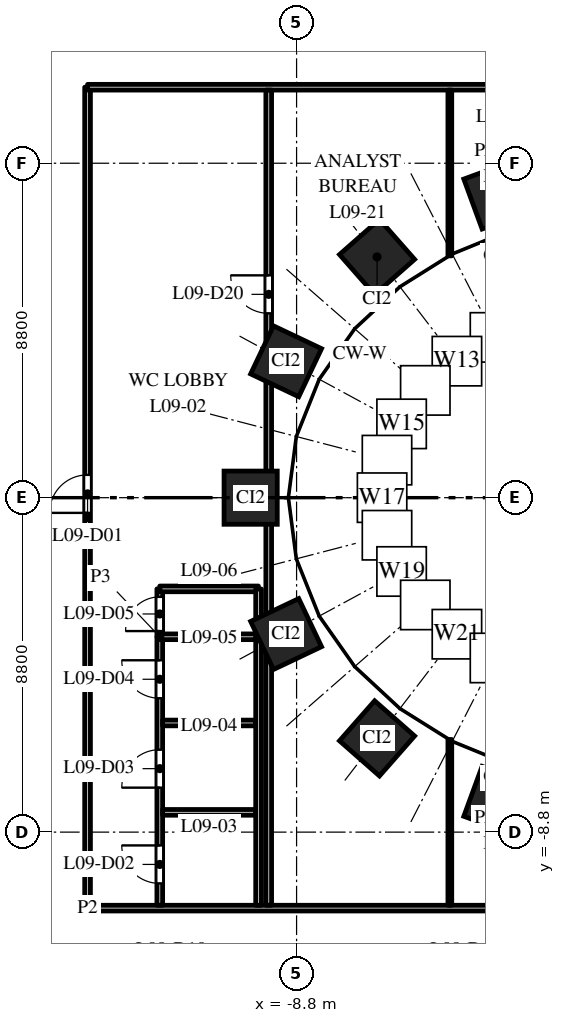
"""IFC4 building model, lengths in metres.
Left out: names, types, materials, properties, quantities, classifications, styles, units other than length and angle.
Written with IfcOpenShell. Run it as: python <this file> out.ifc"""

import sys

from ifc_helpers import new_model, si_unit, direction, frame, frame_2d, origin, origin_2d, place, context, subcontext, project, spatial, rectangle, extrude, element, fill, save


model = new_model("IFC4")
c1 = context("Model", 3, precision=1e-05, world=origin(), true_north=direction((0.0, 1.0)))
c2 = subcontext(c1, "Body", "Model", "MODEL_VIEW")
j1 = project(units=[si_unit("LENGTHUNIT", "METRE"), si_unit("PLANEANGLEUNIT", "RADIAN")], contexts=[c1])
p1 = place(None, origin())
s1 = spatial("IfcSite", under=j1, at=p1, CompositionType="ELEMENT")
p2 = place(p1, origin())
s2 = spatial("IfcBuilding", under=s1, at=p2, CompositionType="ELEMENT")
p3 = place(p2, frame((0.0, 0.0, 46.5)))
s3 = spatial("IfcBuildingStorey", under=s2, at=p3, CompositionType="ELEMENT", Elevation=46.5)
for number, where, z_axis, x_axis in (
    (1, (-3.501, 7.967, 0.0), (0.0, 0.0, 1.0), (-0.939, -0.344, 0.0)),
    (2, (-6.682, 6.334, 0.0), (0.0, 0.0, 1.0), (-0.751, -0.66, 0.0)),
    (3, (-9.076, 3.588, 0.0), (0.0, 0.0, 1.0), (-0.429, -0.903, 0.0)),
    (4, (-10.008, 0.0, 0.0), (0.0, 0.0, 1.0), (0.0, -1.0, 0.0)),
    (5, (-9.076, -3.588, 0.0), (0.0, 0.0, 1.0), (0.429, -0.903, 0.0)),
    (6, (-6.682, -6.334, 0.0), (0.0, 0.0, 1.0), (0.751, -0.66, 0.0)),
    (7, (-3.501, -7.967, 0.0), (0.0, 0.0, 1.0), (0.939, -0.344, 0.0)),
):
    element("IfcColumn", number, at=place(p3, frame(where, z_axis=z_axis, x_axis=x_axis)), inside=s3, PredefinedType="COLUMN", context=c2, shape_type="SweptSolid", body=[
        extrude(rectangle(XDim=1.4, YDim=1.4, at=origin_2d()), origin(), (0.0, 0.0, 1.0), 4.0),
    ])
p4 = place(p3, frame((-14.3, -10.8, 0.0), z_axis=(0.0, 0.0, 1.0), x_axis=(0.0, 1.0, 0.0)))
e8 = element("IfcWall", 8, at=p4, inside=s3, PredefinedType="PARTITIONING", context=c2, shape_type="SweptSolid", body=[
    extrude(rectangle(XDim=21.6, YDim=0.15, at=frame_2d((10.8, 0.0))), origin(), (0.0, 0.0, 1.0), 2.75),
])
p5 = place(p4, frame((10.4, 0.0, 0.0)))
e9 = element("IfcOpeningElement", 9, at=p5, cuts=e8, PredefinedType="OPENING", context=c2, shape_type="SweptSolid", body=[
    extrude(rectangle(XDim=1.0, YDim=2.1, at=frame_2d((0.5, 1.05))), frame((0.0, 0.085, 0.0), z_axis=(0.0, -1.0, 0.0), x_axis=(1.0, 0.0, 0.0)), (0.0, 0.0, 1.0), 0.17),
])
p6 = place(p3, frame((-14.3, -10.8, 0.0), z_axis=(0.0, 0.0, 1.0), x_axis=(1.0, 0.0, 0.0)))
e10 = element("IfcWall", 10, at=p6, inside=s3, PredefinedType="PARTITIONING", context=c2, shape_type="SweptSolid", body=[
    extrude(rectangle(XDim=28.6, YDim=0.15, at=frame_2d((14.3, 0.0))), origin(), (0.0, 0.0, 1.0), 2.85),
])
p7 = place(p6, frame((11.4, 0.0, 0.0)))
e11 = element("IfcOpeningElement", 11, at=p7, cuts=e10, PredefinedType="OPENING", context=c2, shape_type="SweptSolid", body=[
    extrude(rectangle(XDim=1.0, YDim=2.1, at=frame_2d((0.5, 1.05))), frame((0.0, 0.085, 0.0), z_axis=(0.0, -1.0, 0.0), x_axis=(1.0, 0.0, 0.0)), (0.0, 0.0, 1.0), 0.17),
])
p8 = place(p6, frame((16.167, 0.0, 0.0)))
e12 = element("IfcOpeningElement", 12, at=p8, cuts=e10, PredefinedType="OPENING", context=c2, shape_type="SweptSolid", body=[
    extrude(rectangle(XDim=1.0, YDim=2.1, at=frame_2d((0.5, 1.05))), frame((0.0, 0.085, 0.0), z_axis=(0.0, -1.0, 0.0), x_axis=(1.0, 0.0, 0.0)), (0.0, 0.0, 1.0), 0.17),
])
p9 = place(p3, frame((-14.3, 10.8, 0.0), z_axis=(0.0, 0.0, 1.0), x_axis=(1.0, 0.0, 0.0)))
e13 = element("IfcWall", 13, at=p9, inside=s3, PredefinedType="PARTITIONING", context=c2, shape_type="SweptSolid", body=[
    extrude(rectangle(XDim=28.6, YDim=0.15, at=frame_2d((14.3, 0.0))), origin(), (0.0, 0.0, 1.0), 2.85),
])
p10 = place(p9, frame((11.433, 0.0, 0.0)))
e14 = element("IfcOpeningElement", 14, at=p10, cuts=e13, PredefinedType="OPENING", context=c2, shape_type="SweptSolid", body=[
    extrude(rectangle(XDim=1.0, YDim=2.1, at=frame_2d((0.5, 1.05))), frame((0.0, 0.085, 0.0), z_axis=(0.0, -1.0, 0.0), x_axis=(1.0, 0.0, 0.0)), (0.0, 0.0, 1.0), 0.17),
])
p11 = place(p9, frame((16.2, 0.0, 0.0)))
e15 = element("IfcOpeningElement", 15, at=p11, cuts=e13, PredefinedType="OPENING", context=c2, shape_type="SweptSolid", body=[
    extrude(rectangle(XDim=1.0, YDim=2.1, at=frame_2d((0.5, 1.05))), frame((0.0, 0.085, 0.0), z_axis=(0.0, -1.0, 0.0), x_axis=(1.0, 0.0, 0.0)), (0.0, 0.0, 1.0), 0.17),
])
p12 = place(p9, frame((20.967, 0.0, 0.0)))
e16 = element("IfcOpeningElement", 16, at=p12, cuts=e13, PredefinedType="OPENING", context=c2, shape_type="SweptSolid", body=[
    extrude(rectangle(XDim=1.0, YDim=2.1, at=frame_2d((0.5, 1.05))), frame((0.0, 0.085, 0.0), z_axis=(0.0, -1.0, 0.0), x_axis=(1.0, 0.0, 0.0)), (0.0, 0.0, 1.0), 0.17),
])
p13 = place(p3, frame((-12.4, -10.725, 0.0), z_axis=(0.0, 0.0, 1.0), x_axis=(0.0, 1.0, 0.0)))
e17 = element("IfcWall", 17, at=p13, inside=s3, PredefinedType="PARTITIONING", context=c2, shape_type="SweptSolid", body=[
    extrude(rectangle(XDim=7.065, YDim=0.15, at=frame_2d((3.533, 0.0))), origin(), (0.0, 0.0, 1.0), 2.75),
])
p14 = place(p13, frame((0.575, 0.0, 0.0)))
e18 = element("IfcOpeningElement", 18, at=p14, cuts=e17, PredefinedType="OPENING", context=c2, shape_type="SweptSolid", body=[
    extrude(rectangle(XDim=1.0, YDim=2.1, at=frame_2d((0.5, 1.05))), frame((0.0, 0.085, 0.0), z_axis=(0.0, -1.0, 0.0), x_axis=(1.0, 0.0, 0.0)), (0.0, 0.0, 1.0), 0.17),
])
p15 = place(p13, frame((3.095, 0.0, 0.0)))
e19 = element("IfcOpeningElement", 19, at=p15, cuts=e17, PredefinedType="OPENING", context=c2, shape_type="SweptSolid", body=[
    extrude(rectangle(XDim=1.0, YDim=2.1, at=frame_2d((0.5, 1.05))), frame((0.0, 0.085, 0.0), z_axis=(0.0, -1.0, 0.0), x_axis=(1.0, 0.0, 0.0)), (0.0, 0.0, 1.0), 0.17),
])
p16 = place(p13, frame((5.447, 0.0, 0.0)))
e20 = element("IfcOpeningElement", 20, at=p16, cuts=e17, PredefinedType="OPENING", context=c2, shape_type="SweptSolid", body=[
    extrude(rectangle(XDim=1.0, YDim=2.1, at=frame_2d((0.5, 1.05))), frame((0.0, 0.085, 0.0), z_axis=(0.0, -1.0, 0.0), x_axis=(1.0, 0.0, 0.0)), (0.0, 0.0, 1.0), 0.17),
])
p17 = place(p3, frame((-12.325, -8.28, 0.0), z_axis=(0.0, 0.0, 1.0), x_axis=(1.0, 0.0, 0.0)))
e21 = element("IfcWall", 21, at=p17, inside=s3, PredefinedType="PARTITIONING", context=c2, shape_type="SweptSolid", body=[
    extrude(rectangle(XDim=2.45, YDim=0.15, at=frame_2d((1.225, 0.0))), origin(), (0.0, 0.0, 1.0), 2.75),
])
p18 = place(p3, frame((-12.325, -5.928, 0.0), z_axis=(0.0, 0.0, 1.0), x_axis=(1.0, 0.0, 0.0)))
e22 = element("IfcWall", 22, at=p18, inside=s3, PredefinedType="PARTITIONING", context=c2, shape_type="SweptSolid", body=[
    extrude(rectangle(XDim=2.45, YDim=0.15, at=frame_2d((1.225, 0.0))), origin(), (0.0, 0.0, 1.0), 3.7),
])
p19 = place(p3, frame((-12.4, -3.66, 0.0), z_axis=(0.0, 0.0, 1.0), x_axis=(0.0, 1.0, 0.0)))
e23 = element("IfcWall", 23, at=p19, inside=s3, PredefinedType="PARTITIONING", context=c2, shape_type="SweptSolid", body=[
    extrude(rectangle(XDim=1.26, YDim=0.15, at=frame_2d((0.63, 0.0))), origin(), (0.0, 0.0, 1.0), 3.7),
])
p20 = place(p19, frame((0.15, 0.0, 0.0)))
e24 = element("IfcOpeningElement", 24, at=p20, cuts=e23, PredefinedType="OPENING", context=c2, shape_type="SweptSolid", body=[
    extrude(rectangle(XDim=0.9, YDim=2.1, at=frame_2d((0.45, 1.05))), frame((0.0, 0.085, 0.0), z_axis=(0.0, -1.0, 0.0), x_axis=(1.0, 0.0, 0.0)), (0.0, 0.0, 1.0), 0.17),
])
p21 = place(p3, frame((-12.4, -3.66, 0.0), z_axis=(0.0, 0.0, 1.0), x_axis=(1.0, 0.0, 0.0)))
e25 = element("IfcWall", 25, at=p21, inside=s3, PredefinedType="PARTITIONING", context=c2, shape_type="SweptSolid", body=[
    extrude(rectangle(XDim=2.6, YDim=0.15, at=frame_2d((1.3, 0.0))), origin(), (0.0, 0.0, 1.0), 3.7),
])
p22 = place(p3, frame((-12.4, -2.4, 0.0), z_axis=(0.0, 0.0, 1.0), x_axis=(1.0, 0.0, 0.0)))
e26 = element("IfcWall", 26, at=p22, inside=s3, PredefinedType="PARTITIONING", context=c2, shape_type="SweptSolid", body=[
    extrude(rectangle(XDim=2.596, YDim=0.15, at=frame_2d((1.298, 0.0))), origin(), (0.0, 0.0, 1.0), 3.7),
])
p23 = place(p3, frame((-9.8, -10.725, 0.0), z_axis=(0.0, 0.0, 1.0), x_axis=(0.0, 1.0, 0.0)))
e27 = element("IfcWall", 27, at=p23, inside=s3, PredefinedType="PARTITIONING", context=c2, shape_type="SweptSolid", body=[
    extrude(rectangle(XDim=7.065, YDim=0.15, at=frame_2d((3.533, 0.0))), origin(), (0.0, 0.0, 1.0), 2.75),
])
p24 = place(p3, frame((-9.8, -3.66, 0.0), z_axis=(0.0, 0.0, 1.0), x_axis=(0.0, 1.0, 0.0)))
e28 = element("IfcWall", 28, at=p24, inside=s3, PredefinedType="PARTITIONING", context=c2, shape_type="SweptSolid", body=[
    extrude(rectangle(XDim=1.256, YDim=0.15, at=frame_2d((0.628, 0.0))), origin(), (0.0, 0.0, 1.0), 3.7),
])
p25 = place(p3, frame((-9.533, -10.725, 0.0), z_axis=(0.0, 0.0, 1.0), x_axis=(0.0, 1.0, 0.0)))
e29 = element("IfcWall", 29, at=p25, inside=s3, PredefinedType="PARTITIONING", context=c2, shape_type="SweptSolid", body=[
    extrude(rectangle(XDim=21.45, YDim=0.15, at=frame_2d((10.725, 0.0))), origin(), (0.0, 0.0, 1.0), 2.75),
])
p26 = place(p25, frame((15.575, 0.0, 0.0)))
e30 = element("IfcOpeningElement", 30, at=p26, cuts=e29, PredefinedType="OPENING", context=c2, shape_type="SweptSolid", body=[
    extrude(rectangle(XDim=1.0, YDim=2.1, at=frame_2d((0.5, 1.05))), frame((0.0, 0.085, 0.0), z_axis=(0.0, -1.0, 0.0), x_axis=(1.0, 0.0, 0.0)), (0.0, 0.0, 1.0), 0.17),
])
for number, where, z_axis, x_axis in (
    (31, (-4.767, -10.725, 0.0), (0.0, 0.0, 1.0), (0.0, 1.0, 0.0)),
    (32, (-4.767, 6.363, 0.0), (0.0, 0.0, 1.0), (0.0, 1.0, 0.0)),
):
    element("IfcWall", number, at=place(p3, frame(where, z_axis=z_axis, x_axis=x_axis)), inside=s3, PredefinedType="PARTITIONING", context=c2, shape_type="SweptSolid", body=[
        extrude(rectangle(XDim=4.362, YDim=0.1, at=frame_2d((2.181, 0.0))), origin(), (0.0, 0.0, 1.0), 2.85),
    ])
p27 = place(p5, origin())
e33 = element("IfcDoor", 33, at=p27, inside=s3, OperationType="SINGLE_SWING_LEFT", PredefinedType="DOOR", context=c2, shape_type="SweptSolid", body=[
    extrude(rectangle(XDim=1.0, YDim=2.1, at=frame_2d((0.5, 1.05))), frame((0.0, 0.025, 0.0), z_axis=(0.0, -1.0, 0.0), x_axis=(1.0, 0.0, 0.0)), (0.0, 0.0, 1.0), 0.05),
])
fill(e9, e33)
p28 = place(p14, origin())
e34 = element("IfcDoor", 34, at=p28, inside=s3, OperationType="SINGLE_SWING_RIGHT", PredefinedType="DOOR", context=c2, shape_type="SweptSolid", body=[
    extrude(rectangle(XDim=1.0, YDim=2.1, at=frame_2d((0.5, 1.05))), frame((0.0, 0.025, 0.0), z_axis=(0.0, -1.0, 0.0), x_axis=(1.0, 0.0, 0.0)), (0.0, 0.0, 1.0), 0.05),
])
fill(e18, e34)
p29 = place(p15, origin())
e35 = element("IfcDoor", 35, at=p29, inside=s3, OperationType="SINGLE_SWING_LEFT", PredefinedType="DOOR", context=c2, shape_type="SweptSolid", body=[
    extrude(rectangle(XDim=1.0, YDim=2.1, at=frame_2d((0.5, 1.05))), frame((0.0, 0.025, 0.0), z_axis=(0.0, -1.0, 0.0), x_axis=(1.0, 0.0, 0.0)), (0.0, 0.0, 1.0), 0.05),
])
fill(e19, e35)
p30 = place(p16, origin())
e36 = element("IfcDoor", 36, at=p30, inside=s3, OperationType="SINGLE_SWING_RIGHT", PredefinedType="DOOR", context=c2, shape_type="SweptSolid", body=[
    extrude(rectangle(XDim=1.0, YDim=2.1, at=frame_2d((0.5, 1.05))), frame((0.0, 0.025, 0.0), z_axis=(0.0, -1.0, 0.0), x_axis=(1.0, 0.0, 0.0)), (0.0, 0.0, 1.0), 0.05),
])
fill(e20, e36)
p31 = place(p20, origin())
e37 = element("IfcDoor", 37, at=p31, inside=s3, OperationType="SINGLE_SWING_LEFT", PredefinedType="DOOR", context=c2, shape_type="SweptSolid", body=[
    extrude(rectangle(XDim=0.9, YDim=2.1, at=frame_2d((0.45, 1.05))), frame((0.0, 0.025, 0.0), z_axis=(0.0, -1.0, 0.0), x_axis=(1.0, 0.0, 0.0)), (0.0, 0.0, 1.0), 0.05),
])
fill(e24, e37)
p32 = place(p26, origin())
e38 = element("IfcDoor", 38, at=p32, inside=s3, OperationType="SINGLE_SWING_RIGHT", PredefinedType="DOOR", context=c2, shape_type="SweptSolid", body=[
    extrude(rectangle(XDim=1.0, YDim=2.1, at=frame_2d((0.5, 1.05))), frame((0.0, 0.025, 0.0), z_axis=(0.0, -1.0, 0.0), x_axis=(1.0, 0.0, 0.0)), (0.0, 0.0, 1.0), 0.05),
])
fill(e30, e38)
save(model, sys.argv[1])
